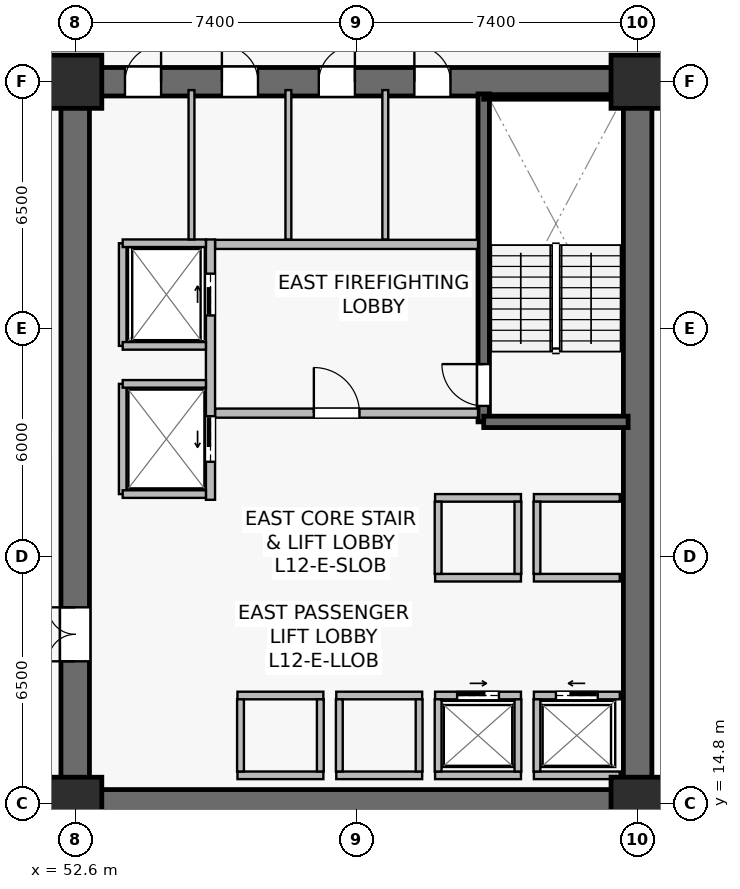
"""IFC4 building model, lengths in metres.
Left out: names, types, materials, properties, quantities, classifications, styles, units other than length and angle.
Written with IfcOpenShell. Run it as: python <this file> out.ifc"""

import sys

from ifc_helpers import new_model, si_unit, direction, frame, frame_2d, origin, origin_2d, place, context, subcontext, project, spatial, rectangle, extrude, source, transform, mapped, element, fill, save


model = new_model("IFC4")
c1 = context("Model", 3, precision=1e-05, world=origin(), true_north=direction((0.0, 1.0)))
c2 = subcontext(c1, "Body", "Model", "MODEL_VIEW")
j1 = project(units=[si_unit("LENGTHUNIT", "METRE"), si_unit("PLANEANGLEUNIT", "RADIAN")], contexts=[c1])
p1 = place(None, origin())
s1 = spatial("IfcSite", under=j1, at=p1, CompositionType="ELEMENT")
p2 = place(p1, origin())
s2 = spatial("IfcBuilding", under=s1, at=p2, CompositionType="ELEMENT")
p3 = place(p2, frame((0.0, 0.0, 49.8)))
s3 = spatial("IfcBuildingStorey", under=s2, at=p3, CompositionType="ELEMENT", Elevation=49.8)
p4 = place(p3, frame((52.225, 14.8, 0.0), z_axis=(0.0, 0.0, 1.0), x_axis=(1.0, 0.0, 0.0)))
e1 = element("IfcWall", 1, at=p4, inside=s3, PredefinedType="SHEAR", context=c2, shape_type="SweptSolid", body=[
    extrude(rectangle(XDim=15.55, YDim=0.75, at=frame_2d((7.775, 0.0))), origin(), (0.0, 0.0, 1.0), 3.78),
])
p5 = place(p3, frame((52.225, 33.8, 0.0), z_axis=(0.0, 0.0, 1.0), x_axis=(1.0, 0.0, 0.0)))
e2 = element("IfcWall", 2, at=p5, inside=s3, PredefinedType="SHEAR", context=c2, shape_type="SweptSolid", body=[
    extrude(rectangle(XDim=15.55, YDim=0.75, at=frame_2d((7.775, 0.0))), origin(), (0.0, 0.0, 1.0), 3.78),
])
p6 = place(p5, frame((9.3, 0.0, 0.0)))
e3 = element("IfcOpeningElement", 3, at=p6, cuts=e2, PredefinedType="OPENING", context=c2, shape_type="SweptSolid", body=[
    extrude(rectangle(XDim=0.95, YDim=2.15, at=frame_2d((0.475, 1.075))), frame((0.0, 0.385, 0.0), z_axis=(0.0, -1.0, 0.0), x_axis=(1.0, 0.0, 0.0)), (0.0, 0.0, 1.0), 0.77),
])
p7 = place(p5, frame((6.785, 0.0, 0.0)))
e4 = element("IfcOpeningElement", 4, at=p7, cuts=e2, PredefinedType="OPENING", context=c2, shape_type="SweptSolid", body=[
    extrude(rectangle(XDim=0.95, YDim=2.15, at=frame_2d((0.475, 1.075))), frame((0.0, 0.385, 0.0), z_axis=(0.0, -1.0, 0.0), x_axis=(1.0, 0.0, 0.0)), (0.0, 0.0, 1.0), 0.77),
])
p8 = place(p5, frame((4.235, 0.0, 0.0)))
e5 = element("IfcOpeningElement", 5, at=p8, cuts=e2, PredefinedType="OPENING", context=c2, shape_type="SweptSolid", body=[
    extrude(rectangle(XDim=0.95, YDim=2.15, at=frame_2d((0.475, 1.075))), frame((0.0, 0.385, 0.0), z_axis=(0.0, -1.0, 0.0), x_axis=(1.0, 0.0, 0.0)), (0.0, 0.0, 1.0), 0.77),
])
p9 = place(p5, frame((1.685, 0.0, 0.0)))
e6 = element("IfcOpeningElement", 6, at=p9, cuts=e2, PredefinedType="OPENING", context=c2, shape_type="SweptSolid", body=[
    extrude(rectangle(XDim=0.95, YDim=2.15, at=frame_2d((0.475, 1.075))), frame((0.0, 0.385, 0.0), z_axis=(0.0, -1.0, 0.0), x_axis=(1.0, 0.0, 0.0)), (0.0, 0.0, 1.0), 0.77),
])
p10 = place(p3, frame((52.6, 15.175, 0.0), z_axis=(0.0, 0.0, 1.0), x_axis=(0.0, 1.0, 0.0)))
e7 = element("IfcWall", 7, at=p10, inside=s3, PredefinedType="SHEAR", context=c2, shape_type="SweptSolid", body=[
    extrude(rectangle(XDim=18.25, YDim=0.75, at=frame_2d((9.125, 0.0))), origin(), (0.0, 0.0, 1.0), 3.78),
])
p11 = place(p10, frame((3.375, 0.0, 0.0)))
e8 = element("IfcOpeningElement", 8, at=p11, cuts=e7, PredefinedType="OPENING", context=c2, shape_type="SweptSolid", body=[
    extrude(rectangle(XDim=1.42, YDim=2.2, at=frame_2d((0.71, 1.1))), frame((0.0, 0.385, 0.0), z_axis=(0.0, -1.0, 0.0), x_axis=(1.0, 0.0, 0.0)), (0.0, 0.0, 1.0), 0.77),
])
p12 = place(p3, frame((67.4, 15.175, 0.0), z_axis=(0.0, 0.0, 1.0), x_axis=(0.0, 1.0, 0.0)))
e9 = element("IfcWall", 9, at=p12, inside=s3, PredefinedType="SHEAR", context=c2, shape_type="SweptSolid", body=[
    extrude(rectangle(XDim=18.25, YDim=0.75, at=frame_2d((9.125, 0.0))), origin(), (0.0, 0.0, 1.0), 3.78),
])
p13 = place(p3, frame((63.35, 24.85, 0.0), z_axis=(0.0, 0.0, 1.0), x_axis=(0.0, 1.0, 0.0)))
e10 = element("IfcWall", 10, at=p13, inside=s3, PredefinedType="SHEAR", context=c2, shape_type="SweptSolid", body=[
    extrude(rectangle(XDim=8.63, YDim=0.3, at=frame_2d((4.315, 0.0))), origin(), (0.0, 0.0, 1.0), 3.78),
])
p14 = place(p13, frame((0.42, 0.0, 0.0)))
e11 = element("IfcOpeningElement", 11, at=p14, cuts=e10, PredefinedType="OPENING", context=c2, shape_type="SweptSolid", body=[
    extrude(rectangle(XDim=1.1, YDim=2.15, at=frame_2d((0.55, 1.075))), frame((0.0, 0.16, 0.0), z_axis=(0.0, -1.0, 0.0), x_axis=(1.0, 0.0, 0.0)), (0.0, 0.0, 1.0), 0.32),
])
p15 = place(p3, frame((63.35, 24.85, 0.0), z_axis=(0.0, 0.0, 1.0), x_axis=(1.0, 0.0, 0.0)))
e12 = element("IfcWall", 12, at=p15, inside=s3, PredefinedType="SHEAR", context=c2, shape_type="SweptSolid", body=[
    extrude(rectangle(XDim=3.8, YDim=0.3, at=frame_2d((1.9, 0.0))), origin(), (0.0, 0.0, 1.0), 3.78),
])
p16 = place(p3, frame((63.35, 33.4, 0.0), z_axis=(0.0, 0.0, 1.0), x_axis=(1.0, 0.0, 0.0)))
e13 = element("IfcWall", 13, at=p16, inside=s3, PredefinedType="SOLIDWALL", context=c2, shape_type="SweptSolid", body=[
    extrude(rectangle(XDim=3.72, YDim=0.12, at=frame_2d((1.86, 0.0))), origin(), (0.0, 0.0, 1.0), 3.78),
])
m1 = source(origin(), c2, "Body", "SweptSolid", [
    extrude(rectangle(XDim=1.4, YDim=1.4, at=origin_2d()), origin(), (0.0, 0.0, 1.0), 4.1),
])
for number, where, z_axis, x_axis in (
    (14, (52.6, 14.8, 0.0), (0.0, 0.0, 1.0), (1.0, 0.0, 0.0)),
    (15, (67.4, 14.8, 0.0), (0.0, 0.0, 1.0), (1.0, 0.0, 0.0)),
    (16, (52.6, 33.8, 0.0), (0.0, 0.0, 1.0), (1.0, 0.0, 0.0)),
    (17, (67.4, 33.8, 0.0), (0.0, 0.0, 1.0), (1.0, 0.0, 0.0)),
):
    element("IfcColumn", number, at=place(p3, frame(where, z_axis=z_axis, x_axis=x_axis)), inside=s3, PredefinedType="COLUMN", context=c2, shape_type="MappedRepresentation", body=[
        mapped(m1, transform((0.0, 0.0, 0.0), scale=1.0)),
    ])
p17 = place(p3, frame((56.28, 25.08, 0.0), z_axis=(0.0, 0.0, 1.0), x_axis=(1.0, 0.0, 0.0)))
e18 = element("IfcWall", 18, at=p17, inside=s3, PredefinedType="SOLIDWALL", context=c2, shape_type="SweptSolid", body=[
    extrude(rectangle(XDim=6.92, YDim=0.24, at=frame_2d((3.46, 0.0))), origin(), (0.0, 0.0, 1.0), 3.065),
])
p18 = place(p17, frame((2.6, 0.0, 0.0)))
e19 = element("IfcOpeningElement", 19, at=p18, cuts=e18, PredefinedType="OPENING", context=c2, shape_type="SweptSolid", body=[
    extrude(rectangle(XDim=1.2, YDim=2.16, at=frame_2d((0.6, 1.08))), frame((0.0, 0.13, 0.0), z_axis=(0.0, -1.0, 0.0), x_axis=(1.0, 0.0, 0.0)), (0.0, 0.0, 1.0), 0.26),
])
p19 = place(p3, frame((56.28, 29.52, 0.0), z_axis=(0.0, 0.0, 1.0), x_axis=(1.0, 0.0, 0.0)))
e20 = element("IfcWall", 20, at=p19, inside=s3, PredefinedType="SOLIDWALL", context=c2, shape_type="SweptSolid", body=[
    extrude(rectangle(XDim=6.92, YDim=0.24, at=frame_2d((3.46, 0.0))), origin(), (0.0, 0.0, 1.0), 3.065),
])
p20 = place(p3, frame((56.16, 22.8, 0.0), z_axis=(0.0, 0.0, 1.0), x_axis=(0.0, 1.0, 0.0)))
e21 = element("IfcWall", 21, at=p20, inside=s3, PredefinedType="SOLIDWALL", context=c2, shape_type="SweptSolid", body=[
    extrude(rectangle(XDim=6.85, YDim=0.24, at=frame_2d((3.425, 0.0))), origin(), (0.0, 0.0, 1.0), 2.865),
])
p21 = place(p20, frame((4.85, 0.0, 0.0)))
e22 = element("IfcOpeningElement", 22, at=p21, cuts=e21, PredefinedType="OPENING", context=c2, shape_type="SweptSolid", body=[
    extrude(rectangle(XDim=1.1, YDim=2.22, at=frame_2d((0.55, 1.11))), frame((0.0, 0.13, 0.0), z_axis=(0.0, -1.0, 0.0), x_axis=(1.0, 0.0, 0.0)), (0.0, 0.0, 1.0), 0.26),
])
p22 = place(p20, frame((1.0, 0.0, 0.0)))
e23 = element("IfcOpeningElement", 23, at=p22, cuts=e21, PredefinedType="OPENING", context=c2, shape_type="SweptSolid", body=[
    extrude(rectangle(XDim=1.2, YDim=2.22, at=frame_2d((0.6, 1.11))), frame((0.0, 0.13, 0.0), z_axis=(0.0, -1.0, 0.0), x_axis=(1.0, 0.0, 0.0)), (0.0, 0.0, 1.0), 0.26),
])
p23 = place(p3, frame((64.67, 17.65, 0.0), z_axis=(0.0, 0.0, 1.0), x_axis=(1.0, 0.0, 0.0)))
e24 = element("IfcWall", 24, at=p23, inside=s3, PredefinedType="SOLIDWALL", context=c2, shape_type="SweptSolid", body=[
    extrude(rectangle(XDim=2.26, YDim=0.2, at=frame_2d((1.13, 0.0))), origin(), (0.0, 0.0, 1.0), 3.78),
])
p24 = place(p23, frame((0.58, 0.0, 0.0)))
e25 = element("IfcOpeningElement", 25, at=p24, cuts=e24, PredefinedType="OPENING", context=c2, shape_type="SweptSolid", body=[
    extrude(rectangle(XDim=1.1, YDim=2.22, at=frame_2d((0.55, 1.11))), frame((0.0, 0.11, 0.0), z_axis=(0.0, -1.0, 0.0), x_axis=(1.0, 0.0, 0.0)), (0.0, 0.0, 1.0), 0.22),
])
p25 = place(p3, frame((64.67, 15.55, 0.0), z_axis=(0.0, 0.0, 1.0), x_axis=(1.0, 0.0, 0.0)))
e26 = element("IfcWall", 26, at=p25, inside=s3, PredefinedType="SOLIDWALL", context=c2, shape_type="SweptSolid", body=[
    extrude(rectangle(XDim=2.26, YDim=0.2, at=frame_2d((1.13, 0.0))), origin(), (0.0, 0.0, 1.0), 3.78),
])
p26 = place(p3, frame((64.75, 15.65, 0.0), z_axis=(0.0, 0.0, 1.0), x_axis=(0.0, 1.0, 0.0)))
e27 = element("IfcWall", 27, at=p26, inside=s3, PredefinedType="SOLIDWALL", context=c2, shape_type="SweptSolid", body=[
    extrude(rectangle(XDim=1.9, YDim=0.18, at=frame_2d((0.95, 0.0))), origin(), (0.0, 0.0, 1.0), 3.78),
])
p27 = place(p3, frame((62.07, 17.65, 0.0), z_axis=(0.0, 0.0, 1.0), x_axis=(1.0, 0.0, 0.0)))
e28 = element("IfcWall", 28, at=p27, inside=s3, PredefinedType="SOLIDWALL", context=c2, shape_type="SweptSolid", body=[
    extrude(rectangle(XDim=2.26, YDim=0.2, at=frame_2d((1.13, 0.0))), origin(), (0.0, 0.0, 1.0), 3.78),
])
p28 = place(p27, frame((0.58, 0.0, 0.0)))
e29 = element("IfcOpeningElement", 29, at=p28, cuts=e28, PredefinedType="OPENING", context=c2, shape_type="SweptSolid", body=[
    extrude(rectangle(XDim=1.1, YDim=2.22, at=frame_2d((0.55, 1.11))), frame((0.0, 0.11, 0.0), z_axis=(0.0, -1.0, 0.0), x_axis=(1.0, 0.0, 0.0)), (0.0, 0.0, 1.0), 0.22),
])
p29 = place(p3, frame((62.07, 15.55, 0.0), z_axis=(0.0, 0.0, 1.0), x_axis=(1.0, 0.0, 0.0)))
e30 = element("IfcWall", 30, at=p29, inside=s3, PredefinedType="SOLIDWALL", context=c2, shape_type="SweptSolid", body=[
    extrude(rectangle(XDim=2.26, YDim=0.2, at=frame_2d((1.13, 0.0))), origin(), (0.0, 0.0, 1.0), 3.78),
])
for number, where, z_axis, x_axis in (
    (31, (62.15, 15.65, 0.0), (0.0, 0.0, 1.0), (0.0, 1.0, 0.0)),
    (32, (64.25, 15.65, 0.0), (0.0, 0.0, 1.0), (0.0, 1.0, 0.0)),
):
    element("IfcWall", number, at=place(p3, frame(where, z_axis=z_axis, x_axis=x_axis)), inside=s3, PredefinedType="SOLIDWALL", context=c2, shape_type="SweptSolid", body=[
        extrude(rectangle(XDim=1.9, YDim=0.18, at=frame_2d((0.95, 0.0))), origin(), (0.0, 0.0, 1.0), 3.78),
    ])
for number, where, z_axis, x_axis in (
    (33, (59.47, 17.65, 0.0), (0.0, 0.0, 1.0), (1.0, 0.0, 0.0)),
    (34, (59.47, 15.55, 0.0), (0.0, 0.0, 1.0), (1.0, 0.0, 0.0)),
):
    element("IfcWall", number, at=place(p3, frame(where, z_axis=z_axis, x_axis=x_axis)), inside=s3, PredefinedType="SOLIDWALL", context=c2, shape_type="SweptSolid", body=[
        extrude(rectangle(XDim=2.26, YDim=0.2, at=frame_2d((1.13, 0.0))), origin(), (0.0, 0.0, 1.0), 3.065),
    ])
for number, where, z_axis, x_axis in (
    (35, (59.55, 15.65, 0.0), (0.0, 0.0, 1.0), (0.0, 1.0, 0.0)),
    (36, (61.65, 15.65, 0.0), (0.0, 0.0, 1.0), (0.0, 1.0, 0.0)),
):
    element("IfcWall", number, at=place(p3, frame(where, z_axis=z_axis, x_axis=x_axis)), inside=s3, PredefinedType="SOLIDWALL", context=c2, shape_type="SweptSolid", body=[
        extrude(rectangle(XDim=1.9, YDim=0.18, at=frame_2d((0.95, 0.0))), origin(), (0.0, 0.0, 1.0), 3.78),
    ])
for number, where, z_axis, x_axis in (
    (37, (56.87, 17.65, 0.0), (0.0, 0.0, 1.0), (1.0, 0.0, 0.0)),
    (38, (56.87, 15.55, 0.0), (0.0, 0.0, 1.0), (1.0, 0.0, 0.0)),
):
    element("IfcWall", number, at=place(p3, frame(where, z_axis=z_axis, x_axis=x_axis)), inside=s3, PredefinedType="SOLIDWALL", context=c2, shape_type="SweptSolid", body=[
        extrude(rectangle(XDim=2.26, YDim=0.2, at=frame_2d((1.13, 0.0))), origin(), (0.0, 0.0, 1.0), 3.78),
    ])
for number, where, z_axis, x_axis in (
    (39, (56.95, 15.65, 0.0), (0.0, 0.0, 1.0), (0.0, 1.0, 0.0)),
    (40, (59.05, 15.65, 0.0), (0.0, 0.0, 1.0), (0.0, 1.0, 0.0)),
):
    element("IfcWall", number, at=place(p3, frame(where, z_axis=z_axis, x_axis=x_axis)), inside=s3, PredefinedType="SOLIDWALL", context=c2, shape_type="SweptSolid", body=[
        extrude(rectangle(XDim=1.9, YDim=0.18, at=frame_2d((0.95, 0.0))), origin(), (0.0, 0.0, 1.0), 3.78),
    ])
for number, where, z_axis, x_axis in (
    (41, (64.67, 20.75, 0.0), (0.0, 0.0, 1.0), (1.0, 0.0, 0.0)),
    (42, (64.67, 22.85, 0.0), (0.0, 0.0, 1.0), (1.0, 0.0, 0.0)),
):
    element("IfcWall", number, at=place(p3, frame(where, z_axis=z_axis, x_axis=x_axis)), inside=s3, PredefinedType="SOLIDWALL", context=c2, shape_type="SweptSolid", body=[
        extrude(rectangle(XDim=2.26, YDim=0.2, at=frame_2d((1.13, 0.0))), origin(), (0.0, 0.0, 1.0), 3.78),
    ])
p30 = place(p3, frame((64.75, 20.85, 0.0), z_axis=(0.0, 0.0, 1.0), x_axis=(0.0, 1.0, 0.0)))
e43 = element("IfcWall", 43, at=p30, inside=s3, PredefinedType="SOLIDWALL", context=c2, shape_type="SweptSolid", body=[
    extrude(rectangle(XDim=1.9, YDim=0.18, at=frame_2d((0.95, 0.0))), origin(), (0.0, 0.0, 1.0), 3.78),
])
for number, where, z_axis, x_axis in (
    (44, (62.07, 20.75, 0.0), (0.0, 0.0, 1.0), (1.0, 0.0, 0.0)),
    (45, (62.07, 22.85, 0.0), (0.0, 0.0, 1.0), (1.0, 0.0, 0.0)),
):
    element("IfcWall", number, at=place(p3, frame(where, z_axis=z_axis, x_axis=x_axis)), inside=s3, PredefinedType="SOLIDWALL", context=c2, shape_type="SweptSolid", body=[
        extrude(rectangle(XDim=2.26, YDim=0.2, at=frame_2d((1.13, 0.0))), origin(), (0.0, 0.0, 1.0), 3.78),
    ])
for number, where, z_axis, x_axis in (
    (46, (62.15, 20.85, 0.0), (0.0, 0.0, 1.0), (0.0, 1.0, 0.0)),
    (47, (64.25, 20.85, 0.0), (0.0, 0.0, 1.0), (0.0, 1.0, 0.0)),
):
    element("IfcWall", number, at=place(p3, frame(where, z_axis=z_axis, x_axis=x_axis)), inside=s3, PredefinedType="SOLIDWALL", context=c2, shape_type="SweptSolid", body=[
        extrude(rectangle(XDim=1.9, YDim=0.18, at=frame_2d((0.95, 0.0))), origin(), (0.0, 0.0, 1.0), 3.78),
    ])
p31 = place(p3, frame((53.85, 26.85, 0.0), z_axis=(0.0, 0.0, 1.0), x_axis=(0.0, 1.0, 0.0)))
e48 = element("IfcWall", 48, at=p31, inside=s3, PredefinedType="SOLIDWALL", context=c2, shape_type="SweptSolid", body=[
    extrude(rectangle(XDim=2.7, YDim=0.2, at=frame_2d((1.35, 0.0))), origin(), (0.0, 0.0, 1.0), 3.78),
])
p32 = place(p3, frame((53.85, 29.55, 0.0), z_axis=(0.0, 0.0, 1.0), x_axis=(1.0, 0.0, 0.0)))
e49 = element("IfcWall", 49, at=p32, inside=s3, PredefinedType="SOLIDWALL", context=c2, shape_type="SweptSolid", body=[
    extrude(rectangle(XDim=2.19, YDim=0.2, at=frame_2d((1.095, 0.0))), origin(), (0.0, 0.0, 1.0), 3.78),
])
p33 = place(p3, frame((53.85, 26.85, 0.0), z_axis=(0.0, 0.0, 1.0), x_axis=(1.0, 0.0, 0.0)))
e50 = element("IfcWall", 50, at=p33, inside=s3, PredefinedType="SOLIDWALL", context=c2, shape_type="SweptSolid", body=[
    extrude(rectangle(XDim=2.19, YDim=0.2, at=frame_2d((1.095, 0.0))), origin(), (0.0, 0.0, 1.0), 3.177),
])
p34 = place(p3, frame((53.85, 22.95, 0.0), z_axis=(0.0, 0.0, 1.0), x_axis=(0.0, 1.0, 0.0)))
e51 = element("IfcWall", 51, at=p34, inside=s3, PredefinedType="SOLIDWALL", context=c2, shape_type="SweptSolid", body=[
    extrude(rectangle(XDim=2.9, YDim=0.2, at=frame_2d((1.45, 0.0))), origin(), (0.0, 0.0, 1.0), 2.865),
])
for number, where, z_axis, x_axis in (
    (52, (53.85, 25.85, 0.0), (0.0, 0.0, 1.0), (1.0, 0.0, 0.0)),
    (53, (53.85, 22.95, 0.0), (0.0, 0.0, 1.0), (1.0, 0.0, 0.0)),
):
    element("IfcWall", number, at=place(p3, frame(where, z_axis=z_axis, x_axis=x_axis)), inside=s3, PredefinedType="SOLIDWALL", context=c2, shape_type="SweptSolid", body=[
        extrude(rectangle(XDim=2.19, YDim=0.2, at=frame_2d((1.095, 0.0))), origin(), (0.0, 0.0, 1.0), 3.78),
    ])
for number, where, z_axis, x_axis in (
    (54, (60.76, 29.65, 0.0), (0.0, 0.0, 1.0), (0.0, 1.0, 0.0)),
    (55, (58.21, 29.65, 0.0), (0.0, 0.0, 1.0), (0.0, 1.0, 0.0)),
    (56, (55.66, 29.65, 0.0), (0.0, 0.0, 1.0), (0.0, 1.0, 0.0)),
):
    element("IfcWall", number, at=place(p3, frame(where, z_axis=z_axis, x_axis=x_axis)), inside=s3, PredefinedType="PLUMBINGWALL", context=c2, shape_type="SweptSolid", body=[
        extrude(rectangle(XDim=3.93, YDim=0.155, at=frame_2d((1.965, 0.0))), origin(), (0.0, 0.0, 1.0), 3.78),
    ])
m2 = source(origin(), c2, "Body", "SweptSolid", [
    extrude(rectangle(XDim=1.1, YDim=2.15, at=frame_2d((0.55, 1.075))), frame((0.0, 0.025, 0.0), z_axis=(0.0, -1.0, 0.0), x_axis=(1.0, 0.0, 0.0)), (0.0, 0.0, 1.0), 0.05),
])
p35 = place(p14, origin())
e57 = element("IfcDoor", 57, at=p35, inside=s3, OperationType="SINGLE_SWING_RIGHT", PredefinedType="DOOR", context=c2, shape_type="MappedRepresentation", body=[
    mapped(m2, transform((0.0, 0.0, 0.0), scale=1.0)),
])
fill(e11, e57)
m3 = source(origin(), c2, "Body", "SweptSolid", [
    extrude(rectangle(XDim=1.2, YDim=2.16, at=frame_2d((0.6, 1.08))), frame((0.0, 0.025, 0.0), z_axis=(0.0, -1.0, 0.0), x_axis=(1.0, 0.0, 0.0)), (0.0, 0.0, 1.0), 0.05),
])
p36 = place(p18, origin())
e58 = element("IfcDoor", 58, at=p36, inside=s3, OperationType="SINGLE_SWING_LEFT", PredefinedType="DOOR", context=c2, shape_type="MappedRepresentation", body=[
    mapped(m3, transform((0.0, 0.0, 0.0), scale=1.0)),
])
fill(e19, e58)
m4 = source(origin(), c2, "Body", "SweptSolid", [
    extrude(rectangle(XDim=1.1, YDim=2.22, at=frame_2d((0.55, 1.11))), frame((0.0, 0.025, 0.0), z_axis=(0.0, -1.0, 0.0), x_axis=(1.0, 0.0, 0.0)), (0.0, 0.0, 1.0), 0.05),
])
p37 = place(p24, origin())
e59 = element("IfcDoor", 59, at=p37, inside=s3, OperationType="SLIDING_TO_LEFT", PredefinedType="USERDEFINED", context=c2, shape_type="MappedRepresentation", body=[
    mapped(m4, transform((0.0, 0.0, 0.0), scale=1.0)),
])
fill(e25, e59)
p38 = place(p28, origin())
e60 = element("IfcDoor", 60, at=p38, inside=s3, OperationType="SLIDING_TO_RIGHT", PredefinedType="USERDEFINED", context=c2, shape_type="MappedRepresentation", body=[
    mapped(m4, transform((0.0, 0.0, 0.0), scale=1.0)),
])
fill(e29, e60)
p39 = place(p21, origin())
e61 = element("IfcDoor", 61, at=p39, inside=s3, OperationType="SLIDING_TO_RIGHT", PredefinedType="USERDEFINED", context=c2, shape_type="MappedRepresentation", body=[
    mapped(m4, transform((0.0, 0.0, 0.0), scale=1.0)),
])
fill(e22, e61)
m5 = source(origin(), c2, "Body", "SweptSolid", [
    extrude(rectangle(XDim=1.2, YDim=2.22, at=frame_2d((0.6, 1.11))), frame((0.0, 0.025, 0.0), z_axis=(0.0, -1.0, 0.0), x_axis=(1.0, 0.0, 0.0)), (0.0, 0.0, 1.0), 0.05),
])
p40 = place(p22, origin())
e62 = element("IfcDoor", 62, at=p40, inside=s3, OperationType="SLIDING_TO_LEFT", PredefinedType="USERDEFINED", context=c2, shape_type="MappedRepresentation", body=[
    mapped(m5, transform((0.0, 0.0, 0.0), scale=1.0)),
])
fill(e23, e62)
m6 = source(origin(), c2, "Body", "SweptSolid", [
    extrude(rectangle(XDim=1.42, YDim=2.2, at=frame_2d((0.71, 1.1))), frame((0.0, 0.025, 0.0), z_axis=(0.0, -1.0, 0.0), x_axis=(1.0, 0.0, 0.0)), (0.0, 0.0, 1.0), 0.05),
])
p41 = place(p11, origin())
e63 = element("IfcDoor", 63, at=p41, inside=s3, OperationType="DOUBLE_DOOR_SINGLE_SWING", PredefinedType="DOOR", context=c2, shape_type="MappedRepresentation", body=[
    mapped(m6, transform((0.0, 0.0, 0.0), scale=1.0)),
])
fill(e8, e63)
m7 = source(origin(), c2, "Body", "SweptSolid", [
    extrude(rectangle(XDim=0.95, YDim=2.15, at=frame_2d((0.475, 1.075))), frame((0.0, 0.025, 0.0), z_axis=(0.0, -1.0, 0.0), x_axis=(1.0, 0.0, 0.0)), (0.0, 0.0, 1.0), 0.05),
])
p42 = place(p6, origin())
e64 = element("IfcDoor", 64, at=p42, inside=s3, OperationType="SINGLE_SWING_LEFT", PredefinedType="DOOR", context=c2, shape_type="MappedRepresentation", body=[
    mapped(m7, transform((0.0, 0.0, 0.0), scale=1.0)),
])
fill(e3, e64)
p43 = place(p7, origin())
e65 = element("IfcDoor", 65, at=p43, inside=s3, OperationType="SINGLE_SWING_RIGHT", PredefinedType="DOOR", context=c2, shape_type="MappedRepresentation", body=[
    mapped(m7, transform((0.0, 0.0, 0.0), scale=1.0)),
])
fill(e4, e65)
p44 = place(p8, origin())
e66 = element("IfcDoor", 66, at=p44, inside=s3, OperationType="SINGLE_SWING_LEFT", PredefinedType="DOOR", context=c2, shape_type="MappedRepresentation", body=[
    mapped(m7, transform((0.0, 0.0, 0.0), scale=1.0)),
])
fill(e5, e66)
p45 = place(p9, origin())
e67 = element("IfcDoor", 67, at=p45, inside=s3, OperationType="SINGLE_SWING_RIGHT", PredefinedType="DOOR", context=c2, shape_type="MappedRepresentation", body=[
    mapped(m7, transform((0.0, 0.0, 0.0), scale=1.0)),
])
fill(e6, e67)
save(model, sys.argv[1])
